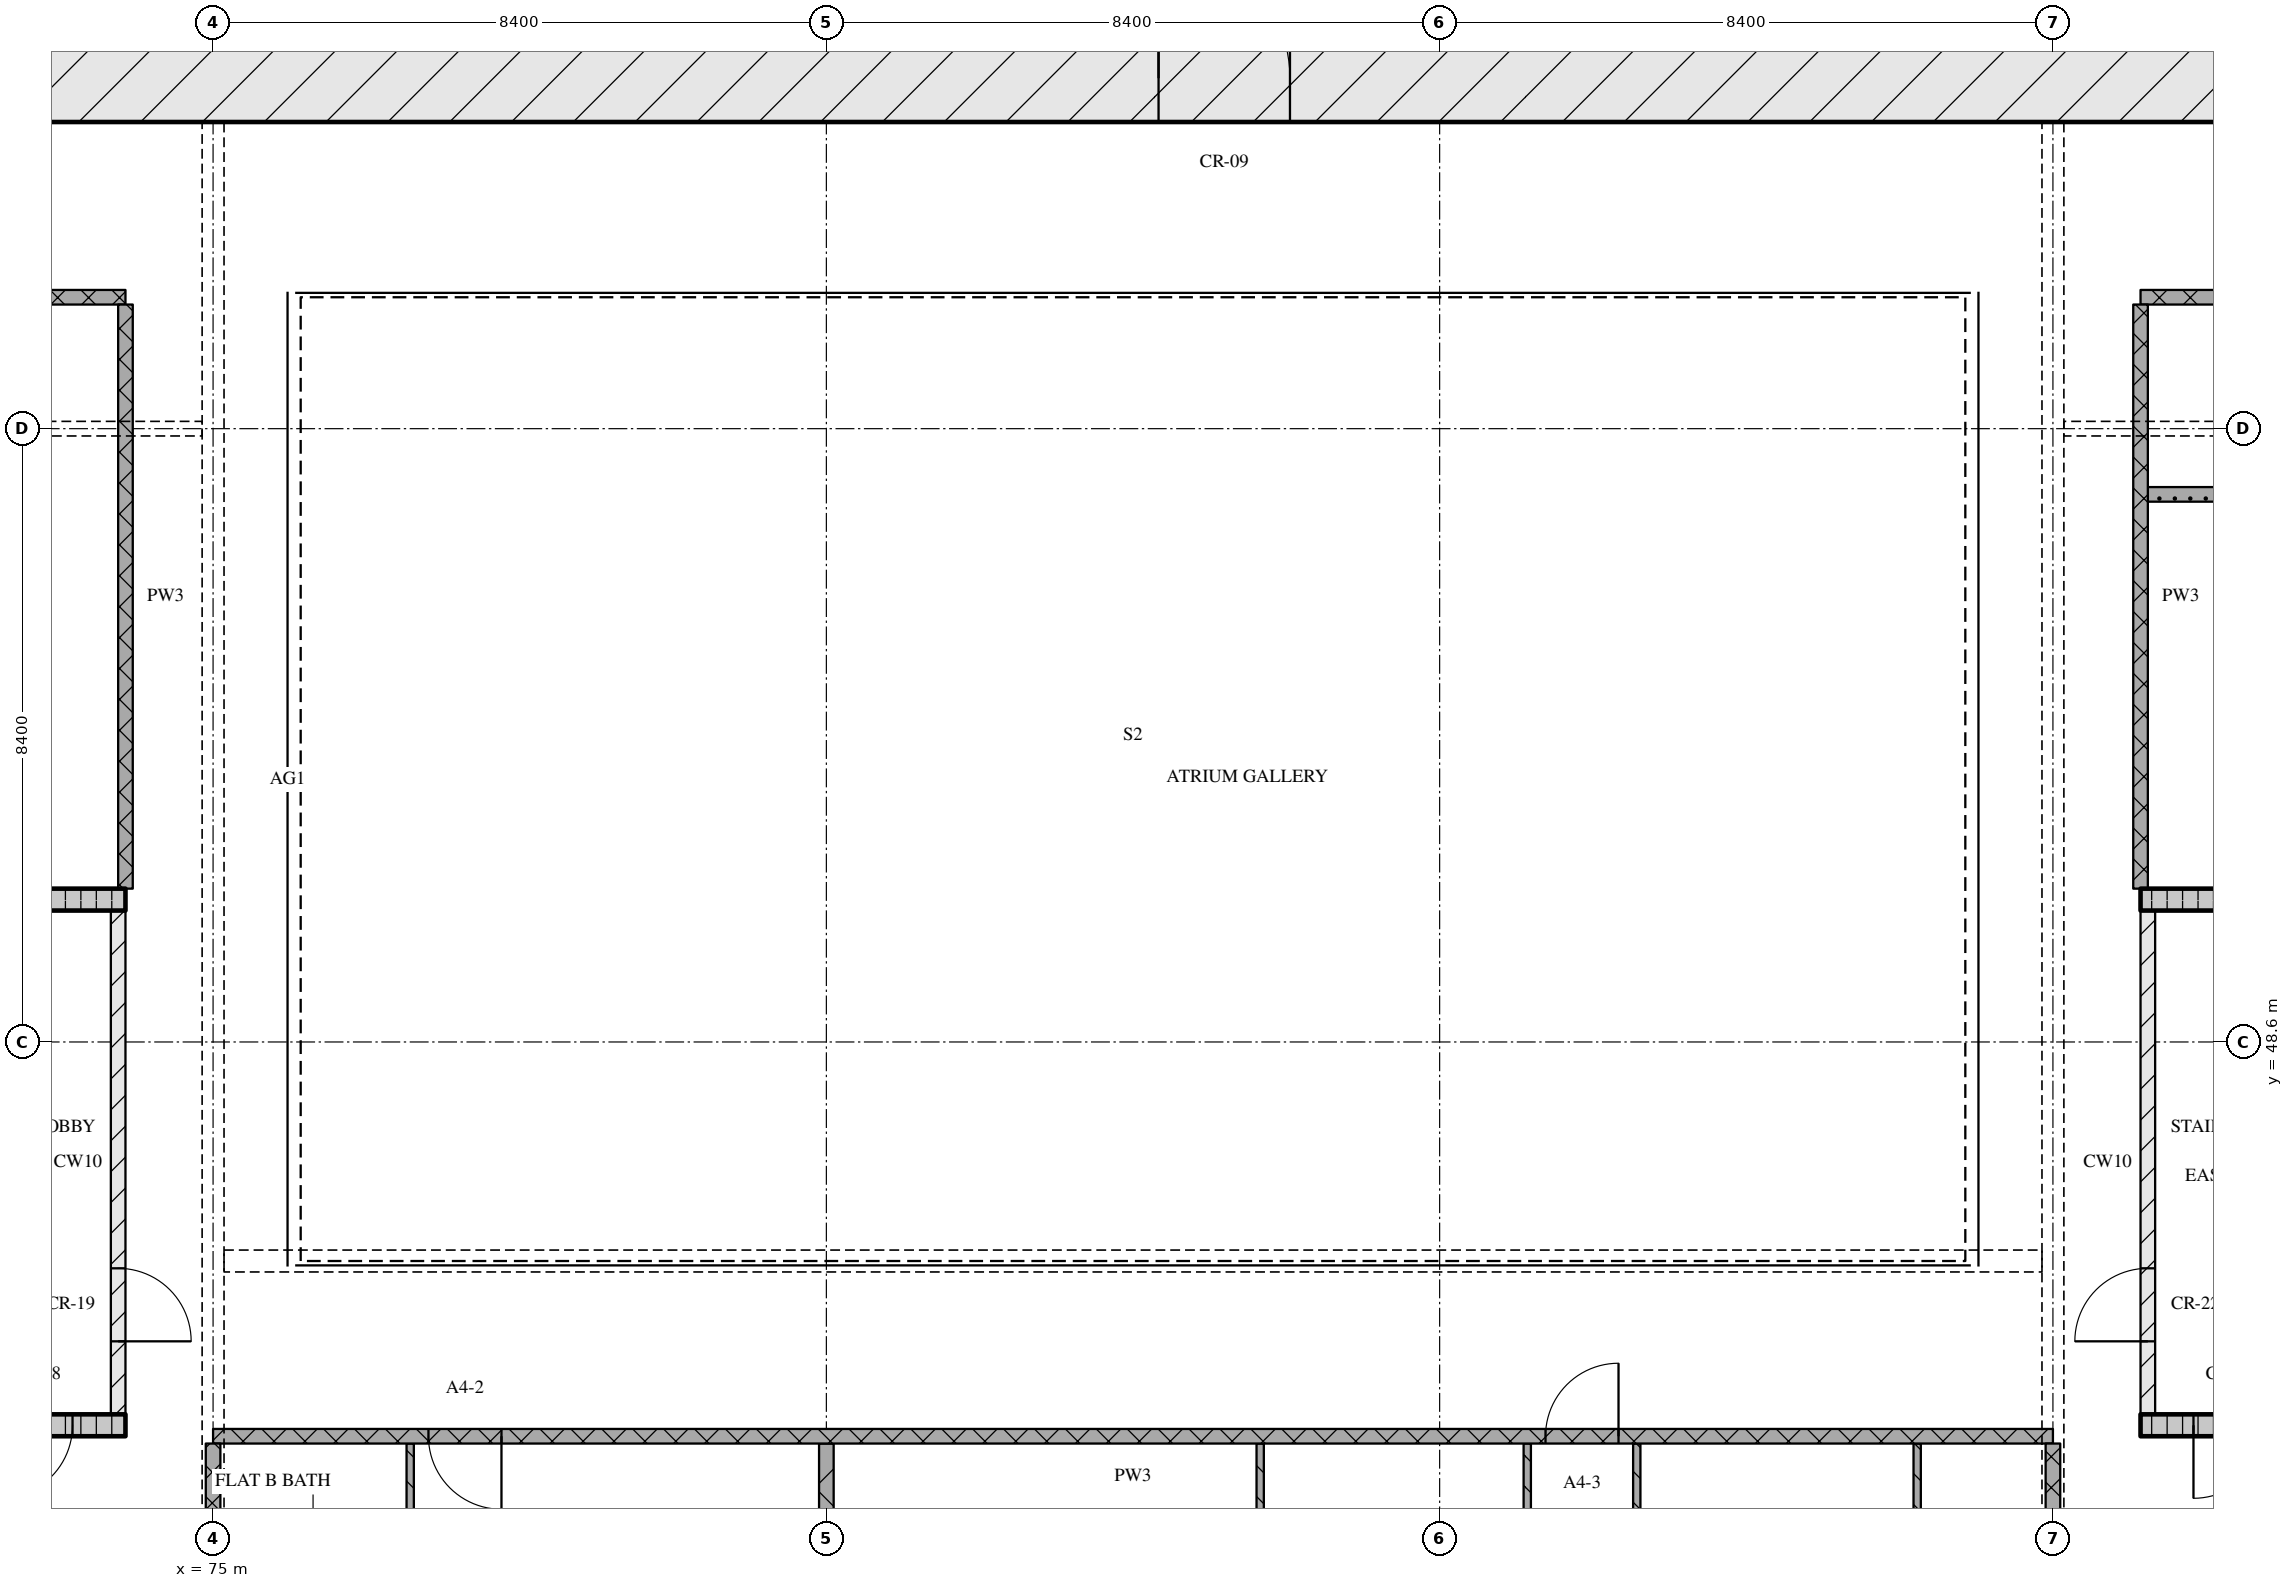
"""IFC4 building model, lengths in metres.
Left out: names, types, materials, properties, quantities, classifications, styles, units other than length and angle.
Written with IfcOpenShell. Run it as: python <this file> out.ifc"""

import sys

from ifc_helpers import new_model, si_unit, direction, frame, frame_2d, origin, place, context, subcontext, project, spatial, rectangle, extrude, element, fill, save


model = new_model("IFC4")
c1 = context("Model", 3, precision=1e-05, world=origin(), true_north=direction((0.0, 1.0)))
c2 = subcontext(c1, "Body", "Model", "MODEL_VIEW")
j1 = project(units=[si_unit("LENGTHUNIT", "METRE"), si_unit("PLANEANGLEUNIT", "RADIAN")], contexts=[c1])
p1 = place(None, origin())
s1 = spatial("IfcSite", under=j1, at=p1, CompositionType="ELEMENT")
p2 = place(p1, origin())
s2 = spatial("IfcBuilding", under=s1, at=p2, CompositionType="ELEMENT")
p3 = place(p2, frame((0.0, 0.0, 76.8)))
s3 = spatial("IfcBuildingStorey", under=s2, at=p3, CompositionType="ELEMENT", Elevation=76.8)
p4 = place(p3, frame((66.6, 61.8, 0.0), z_axis=(0.0, 0.0, 1.0), x_axis=(1.0, 0.0, 0.0)))
e1 = element("IfcWall", 1, at=p4, inside=s3, PredefinedType="SOLIDWALL", context=c2, shape_type="SweptSolid", body=[
    extrude(rectangle(XDim=42.0, YDim=1.2, at=frame_2d((21.0, 0.0))), origin(), (0.0, 0.0, 1.0), 3.32),
])
p5 = place(p4, frame((21.35, 0.0, 0.0)))
e2 = element("IfcOpeningElement", 2, at=p5, cuts=e1, PredefinedType="OPENING", context=c2, shape_type="SweptSolid", body=[
    extrude(rectangle(XDim=1.8, YDim=2.1, at=frame_2d((0.9, 1.05))), frame((0.0, 0.61, 0.0), z_axis=(0.0, -1.0, 0.0), x_axis=(1.0, 0.0, 0.0)), (0.0, 0.0, 1.0), 1.22),
])
p6 = place(p3, frame((68.2, 43.35, 0.0), z_axis=(0.0, 0.0, 1.0), x_axis=(1.0, 0.0, 0.0)))
e3 = element("IfcWall", 3, at=p6, inside=s3, PredefinedType="SOLIDWALL", context=c2, shape_type="SweptSolid", body=[
    extrude(rectangle(XDim=5.6, YDim=0.3, at=frame_2d((2.8, 0.0))), origin(), (0.0, 0.0, 1.0), 3.32),
])
p7 = place(p6, frame((3.875, 0.0, 0.0)))
e4 = element("IfcOpeningElement", 4, at=p7, cuts=e3, PredefinedType="OPENING", context=c2, shape_type="SweptSolid", body=[
    extrude(rectangle(XDim=1.0, YDim=2.1, at=frame_2d((0.5, 1.05))), frame((0.0, 0.16, 0.0), z_axis=(0.0, -1.0, 0.0), x_axis=(1.0, 0.0, 0.0)), (0.0, 0.0, 1.0), 0.32),
])
p8 = place(p3, frame((73.7, 43.5, 0.0), z_axis=(0.0, 0.0, 1.0), x_axis=(0.0, 1.0, 0.0)))
e5 = element("IfcWall", 5, at=p8, inside=s3, PredefinedType="PARTITIONING", context=c2, shape_type="SweptSolid", body=[
    extrude(rectangle(XDim=6.9, YDim=0.2, at=frame_2d((3.45, 0.0))), origin(), (0.0, 0.0, 1.0), 3.32),
])
p9 = place(p8, frame((1.0, 0.0, 0.0)))
e6 = element("IfcOpeningElement", 6, at=p9, cuts=e5, PredefinedType="OPENING", context=c2, shape_type="SweptSolid", body=[
    extrude(rectangle(XDim=1.0, YDim=2.1, at=frame_2d((0.5, 1.05))), frame((0.0, 0.11, 0.0), z_axis=(0.0, -1.0, 0.0), x_axis=(1.0, 0.0, 0.0)), (0.0, 0.0, 1.0), 0.22),
])
p10 = place(p3, frame((68.2, 50.55, 0.0), z_axis=(0.0, 0.0, 1.0), x_axis=(1.0, 0.0, 0.0)))
e7 = element("IfcWall", 7, at=p10, inside=s3, PredefinedType="SOLIDWALL", context=c2, shape_type="SweptSolid", body=[
    extrude(rectangle(XDim=5.6, YDim=0.3, at=frame_2d((2.8, 0.0))), origin(), (0.0, 0.0, 1.0), 3.32),
])
p11 = place(p3, frame((101.4, 43.35, 0.0), z_axis=(0.0, 0.0, 1.0), x_axis=(1.0, 0.0, 0.0)))
e8 = element("IfcWall", 8, at=p11, inside=s3, PredefinedType="SOLIDWALL", context=c2, shape_type="SweptSolid", body=[
    extrude(rectangle(XDim=5.6, YDim=0.3, at=frame_2d((2.8, 0.0))), origin(), (0.0, 0.0, 1.0), 3.32),
])
p12 = place(p11, frame((0.725, 0.0, 0.0)))
e9 = element("IfcOpeningElement", 9, at=p12, cuts=e8, PredefinedType="OPENING", context=c2, shape_type="SweptSolid", body=[
    extrude(rectangle(XDim=1.0, YDim=2.1, at=frame_2d((0.5, 1.05))), frame((0.0, 0.16, 0.0), z_axis=(0.0, -1.0, 0.0), x_axis=(1.0, 0.0, 0.0)), (0.0, 0.0, 1.0), 0.32),
])
p13 = place(p3, frame((101.5, 43.5, 0.0), z_axis=(0.0, 0.0, 1.0), x_axis=(0.0, 1.0, 0.0)))
e10 = element("IfcWall", 10, at=p13, inside=s3, PredefinedType="PARTITIONING", context=c2, shape_type="SweptSolid", body=[
    extrude(rectangle(XDim=6.9, YDim=0.2, at=frame_2d((3.45, 0.0))), origin(), (0.0, 0.0, 1.0), 3.32),
])
p14 = place(p13, frame((1.0, 0.0, 0.0)))
e11 = element("IfcOpeningElement", 11, at=p14, cuts=e10, PredefinedType="OPENING", context=c2, shape_type="SweptSolid", body=[
    extrude(rectangle(XDim=1.0, YDim=2.1, at=frame_2d((0.5, 1.05))), frame((0.0, 0.11, 0.0), z_axis=(0.0, -1.0, 0.0), x_axis=(1.0, 0.0, 0.0)), (0.0, 0.0, 1.0), 0.22),
])
p15 = place(p3, frame((101.4, 50.55, 0.0), z_axis=(0.0, 0.0, 1.0), x_axis=(1.0, 0.0, 0.0)))
e12 = element("IfcWall", 12, at=p15, inside=s3, PredefinedType="SOLIDWALL", context=c2, shape_type="SweptSolid", body=[
    extrude(rectangle(XDim=5.6, YDim=0.3, at=frame_2d((2.8, 0.0))), origin(), (0.0, 0.0, 1.0), 3.32),
])
p16 = place(p3, frame((100.2, 43.2, 0.0), z_axis=(0.0, 0.0, 1.0), x_axis=(-1.0, 0.0, 0.0)))
e13 = element("IfcWall", 13, at=p16, inside=s3, PredefinedType="PARTITIONING", context=c2, shape_type="SweptSolid", body=[
    extrude(rectangle(XDim=25.2, YDim=0.2, at=frame_2d((12.6, 0.0))), origin(), (0.0, 0.0, 1.0), 3.32),
])
p17 = place(p16, frame((5.95, 0.0, 0.0)))
e14 = element("IfcOpeningElement", 14, at=p17, cuts=e13, PredefinedType="OPENING", context=c2, shape_type="SweptSolid", body=[
    extrude(rectangle(XDim=1.0, YDim=2.1, at=frame_2d((0.5, 1.05))), frame((0.0, 0.11, 0.0), z_axis=(0.0, -1.0, 0.0), x_axis=(1.0, 0.0, 0.0)), (0.0, 0.0, 1.0), 0.22),
])
p18 = place(p16, frame((21.25, 0.0, 0.0)))
e15 = element("IfcOpeningElement", 15, at=p18, cuts=e13, PredefinedType="OPENING", context=c2, shape_type="SweptSolid", body=[
    extrude(rectangle(XDim=1.0, YDim=2.1, at=frame_2d((0.5, 1.05))), frame((0.0, 0.11, 0.0), z_axis=(0.0, -1.0, 0.0), x_axis=(1.0, 0.0, 0.0)), (0.0, 0.0, 1.0), 0.22),
])
p19 = place(p3, frame((101.5, 56.1, 0.0), z_axis=(0.0, 0.0, 1.0), x_axis=(1.0, 0.0, 0.0)))
e16 = element("IfcWall", 16, at=p19, inside=s3, PredefinedType="PARTITIONING", context=c2, shape_type="SweptSolid", body=[
    extrude(rectangle(XDim=7.0, YDim=0.2, at=frame_2d((3.5, 0.0))), origin(), (0.0, 0.0, 1.0), 3.32),
])
p20 = place(p3, frame((73.8, 58.8, 0.0), z_axis=(0.0, 0.0, 1.0), x_axis=(-1.0, 0.0, 0.0)))
e17 = element("IfcWall", 17, at=p20, inside=s3, PredefinedType="PARTITIONING", context=c2, shape_type="SweptSolid", body=[
    extrude(rectangle(XDim=7.2, YDim=0.2, at=frame_2d((3.6, 0.0))), origin(), (0.0, 0.0, 1.0), 3.32),
])
p21 = place(p20, frame((3.0, 0.0, 0.0)))
e18 = element("IfcOpeningElement", 18, at=p21, cuts=e17, PredefinedType="OPENING", context=c2, shape_type="SweptSolid", body=[
    extrude(rectangle(XDim=1.2, YDim=2.1, at=frame_2d((0.6, 1.05))), frame((0.0, 0.11, 0.0), z_axis=(0.0, -1.0, 0.0), x_axis=(1.0, 0.0, 0.0)), (0.0, 0.0, 1.0), 0.22),
])
p22 = place(p3, frame((101.4, 58.8, 0.0), z_axis=(0.0, 0.0, 1.0), x_axis=(1.0, 0.0, 0.0)))
e19 = element("IfcWall", 19, at=p22, inside=s3, PredefinedType="PARTITIONING", context=c2, shape_type="SweptSolid", body=[
    extrude(rectangle(XDim=7.2, YDim=0.2, at=frame_2d((3.6, 0.0))), origin(), (0.0, 0.0, 1.0), 3.32),
])
p23 = place(p3, frame((73.8, 58.7, 0.0), z_axis=(0.0, 0.0, 1.0), x_axis=(0.0, -1.0, 0.0)))
e20 = element("IfcWall", 20, at=p23, inside=s3, PredefinedType="PARTITIONING", context=c2, shape_type="SweptSolid", body=[
    extrude(rectangle(XDim=8.0, YDim=0.2, at=frame_2d((4.0, 0.0))), origin(), (0.0, 0.0, 1.0), 3.32),
])
p24 = place(p3, frame((75.0, 43.1, 0.0), z_axis=(0.0, 0.0, 1.0), x_axis=(0.0, -1.0, 0.0)))
e21 = element("IfcWall", 21, at=p24, inside=s3, PredefinedType="PARTITIONING", context=c2, shape_type="SweptSolid", body=[
    extrude(rectangle(XDim=2.2, YDim=0.2, at=frame_2d((1.1, 0.0))), origin(), (0.0, 0.0, 1.0), 2.43),
])
p25 = place(p3, frame((77.7, 43.1, 0.0), z_axis=(0.0, 0.0, 1.0), x_axis=(0.0, -1.0, 0.0)))
e22 = element("IfcWall", 22, at=p25, inside=s3, PredefinedType="PARTITIONING", context=c2, shape_type="SweptSolid", body=[
    extrude(rectangle(XDim=2.85, YDim=0.1, at=frame_2d((1.425, 0.0))), origin(), (0.0, 0.0, 1.0), 3.32),
])
p26 = place(p3, frame((83.4, 43.1, 0.0), z_axis=(0.0, 0.0, 1.0), x_axis=(0.0, -1.0, 0.0)))
e23 = element("IfcWall", 23, at=p26, inside=s3, PredefinedType="PARTITIONING", context=c2, shape_type="SweptSolid", body=[
    extrude(rectangle(XDim=2.43, YDim=0.2, at=frame_2d((1.215, 0.0))), origin(), (0.0, 0.0, 1.0), 3.32),
])
for number, where, z_axis, x_axis in (
    (24, (89.342, 43.1, 0.0), (0.0, 0.0, 1.0), (0.0, -1.0, 0.0)),
    (25, (93.0, 43.1, 0.0), (0.0, 0.0, 1.0), (0.0, -1.0, 0.0)),
):
    element("IfcWall", number, at=place(p3, frame(where, z_axis=z_axis, x_axis=x_axis)), inside=s3, PredefinedType="PARTITIONING", context=c2, shape_type="SweptSolid", body=[
        extrude(rectangle(XDim=6.75, YDim=0.1, at=frame_2d((3.375, 0.0))), origin(), (0.0, 0.0, 1.0), 3.32),
    ])
p27 = place(p3, frame((94.5, 43.1, 0.0), z_axis=(0.0, 0.0, 1.0), x_axis=(0.0, -1.0, 0.0)))
e26 = element("IfcWall", 26, at=p27, inside=s3, PredefinedType="PARTITIONING", context=c2, shape_type="SweptSolid", body=[
    extrude(rectangle(XDim=6.75, YDim=0.1, at=frame_2d((3.375, 0.0))), origin(), (0.0, 0.0, 1.0), 3.32),
])
p28 = place(p27, frame((2.95, 0.0, 0.0)))
e27 = element("IfcOpeningElement", 27, at=p28, cuts=e26, PredefinedType="OPENING", context=c2, shape_type="SweptSolid", body=[
    extrude(rectangle(XDim=0.8, YDim=2.1, at=frame_2d((0.4, 1.05))), frame((0.0, 0.06, 0.0), z_axis=(0.0, -1.0, 0.0), x_axis=(1.0, 0.0, 0.0)), (0.0, 0.0, 1.0), 0.12),
])
p29 = place(p3, frame((98.341, 43.1, 0.0), z_axis=(0.0, 0.0, 1.0), x_axis=(0.0, -1.0, 0.0)))
e28 = element("IfcWall", 28, at=p29, inside=s3, PredefinedType="PARTITIONING", context=c2, shape_type="SweptSolid", body=[
    extrude(rectangle(XDim=6.75, YDim=0.1, at=frame_2d((3.375, 0.0))), origin(), (0.0, 0.0, 1.0), 3.32),
])
p30 = place(p3, frame((100.2, 43.1, 0.0), z_axis=(0.0, 0.0, 1.0), x_axis=(0.0, -1.0, 0.0)))
e29 = element("IfcWall", 29, at=p30, inside=s3, PredefinedType="PARTITIONING", context=c2, shape_type="SweptSolid", body=[
    extrude(rectangle(XDim=2.2, YDim=0.2, at=frame_2d((1.1, 0.0))), origin(), (0.0, 0.0, 1.0), 2.43),
])
p31 = place(p3, frame((101.4, 58.7, 0.0), z_axis=(0.0, 0.0, 1.0), x_axis=(0.0, -1.0, 0.0)))
e30 = element("IfcWall", 30, at=p31, inside=s3, PredefinedType="PARTITIONING", context=c2, shape_type="SweptSolid", body=[
    extrude(rectangle(XDim=8.0, YDim=0.2, at=frame_2d((4.0, 0.0))), origin(), (0.0, 0.0, 1.0), 3.32),
])
p32 = place(p5, origin())
e31 = element("IfcDoor", 31, at=p32, inside=s3, OperationType="DOUBLE_DOOR_SINGLE_SWING", PredefinedType="DOOR", context=c2, shape_type="SweptSolid", body=[
    extrude(rectangle(XDim=1.8, YDim=2.1, at=frame_2d((0.9, 1.05))), frame((0.0, 0.025, 0.0), z_axis=(0.0, -1.0, 0.0), x_axis=(1.0, 0.0, 0.0)), (0.0, 0.0, 1.0), 0.05),
])
fill(e2, e31)
p33 = place(p7, origin())
e32 = element("IfcDoor", 32, at=p33, inside=s3, OperationType="SINGLE_SWING_RIGHT", PredefinedType="DOOR", context=c2, shape_type="SweptSolid", body=[
    extrude(rectangle(XDim=1.0, YDim=2.1, at=frame_2d((0.5, 1.05))), frame((0.0, 0.025, 0.0), z_axis=(0.0, -1.0, 0.0), x_axis=(1.0, 0.0, 0.0)), (0.0, 0.0, 1.0), 0.05),
])
fill(e4, e32)
p34 = place(p9, origin())
e33 = element("IfcDoor", 33, at=p34, inside=s3, OperationType="SINGLE_SWING_RIGHT", PredefinedType="DOOR", context=c2, shape_type="SweptSolid", body=[
    extrude(rectangle(XDim=1.0, YDim=2.1, at=frame_2d((0.5, 1.05))), frame((0.0, 0.025, 0.0), z_axis=(0.0, -1.0, 0.0), x_axis=(1.0, 0.0, 0.0)), (0.0, 0.0, 1.0), 0.05),
])
fill(e6, e33)
p35 = place(p12, origin())
e34 = element("IfcDoor", 34, at=p35, inside=s3, OperationType="SINGLE_SWING_RIGHT", PredefinedType="DOOR", context=c2, shape_type="SweptSolid", body=[
    extrude(rectangle(XDim=1.0, YDim=2.1, at=frame_2d((0.5, 1.05))), frame((0.0, 0.025, 0.0), z_axis=(0.0, -1.0, 0.0), x_axis=(1.0, 0.0, 0.0)), (0.0, 0.0, 1.0), 0.05),
])
fill(e9, e34)
p36 = place(p14, origin())
e35 = element("IfcDoor", 35, at=p36, inside=s3, OperationType="SINGLE_SWING_LEFT", PredefinedType="DOOR", context=c2, shape_type="SweptSolid", body=[
    extrude(rectangle(XDim=1.0, YDim=2.1, at=frame_2d((0.5, 1.05))), frame((0.0, 0.025, 0.0), z_axis=(0.0, -1.0, 0.0), x_axis=(1.0, 0.0, 0.0)), (0.0, 0.0, 1.0), 0.05),
])
fill(e11, e35)
p37 = place(p17, origin())
e36 = element("IfcDoor", 36, at=p37, inside=s3, OperationType="SINGLE_SWING_RIGHT", PredefinedType="DOOR", context=c2, shape_type="SweptSolid", body=[
    extrude(rectangle(XDim=1.0, YDim=2.1, at=frame_2d((0.5, 1.05))), frame((0.0, 0.025, 0.0), z_axis=(0.0, -1.0, 0.0), x_axis=(1.0, 0.0, 0.0)), (0.0, 0.0, 1.0), 0.05),
])
fill(e14, e36)
p38 = place(p18, origin())
e37 = element("IfcDoor", 37, at=p38, inside=s3, OperationType="SINGLE_SWING_LEFT", PredefinedType="DOOR", context=c2, shape_type="SweptSolid", body=[
    extrude(rectangle(XDim=1.0, YDim=2.1, at=frame_2d((0.5, 1.05))), frame((0.0, 0.025, 0.0), z_axis=(0.0, -1.0, 0.0), x_axis=(1.0, 0.0, 0.0)), (0.0, 0.0, 1.0), 0.05),
])
fill(e15, e37)
save(model, sys.argv[1])
